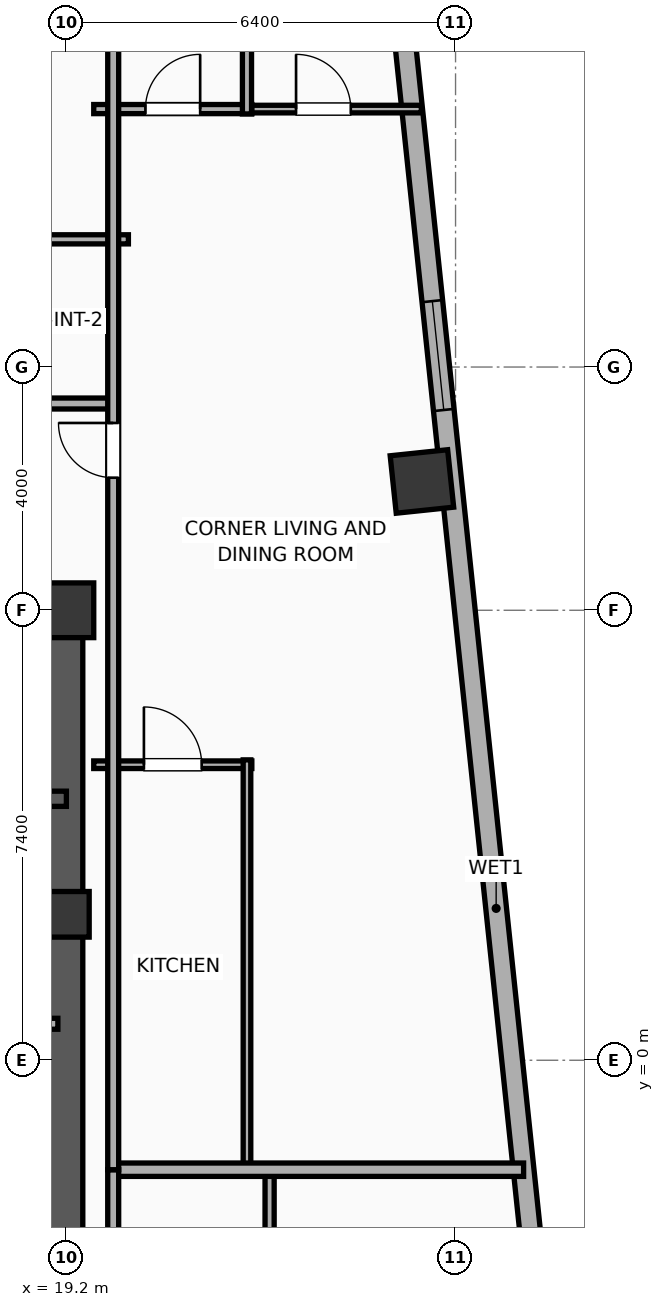
"""IFC4 building model, lengths in metres.
Left out: names, types, materials, properties, quantities, classifications, styles, units other than length and angle.
Written with IfcOpenShell. Run it as: python <this file> out.ifc"""

import sys

from ifc_helpers import new_model, si_unit, direction, frame, frame_2d, origin, origin_2d, place, context, subcontext, project, spatial, rectangle, hollow_rectangle, extrude, element, fill, save


model = new_model("IFC4")
c1 = context("Model", 3, precision=1e-05, world=origin(), true_north=direction((0.0, 1.0)))
c2 = subcontext(c1, "Body", "Model", "MODEL_VIEW")
j1 = project(units=[si_unit("LENGTHUNIT", "METRE"), si_unit("PLANEANGLEUNIT", "RADIAN")], contexts=[c1])
p1 = place(None, origin())
s1 = spatial("IfcSite", under=j1, at=p1, CompositionType="ELEMENT")
p2 = place(p1, origin())
s2 = spatial("IfcBuilding", under=s1, at=p2, CompositionType="ELEMENT")
p3 = place(p2, frame((0.0, 0.0, 175.5)))
s3 = spatial("IfcBuildingStorey", under=s2, at=p3, CompositionType="ELEMENT", Elevation=175.5)
p4 = place(p3, frame((19.2, 2.4, 0.0), z_axis=(0.0, 0.0, 1.0), x_axis=(1.0, 0.0, 0.0)))
e1 = element("IfcColumn", 1, at=p4, inside=s3, PredefinedType="COLUMN", context=c2, shape_type="SweptSolid", body=[
    extrude(rectangle(XDim=0.75, YDim=0.75, at=origin_2d()), origin(), (0.0, 0.0, 1.0), 3.9),
])
p5 = place(p3, frame((19.2, 7.4, 0.0), z_axis=(0.0, 0.0, 1.0), x_axis=(1.0, 0.0, 0.0)))
e2 = element("IfcColumn", 2, at=p5, inside=s3, PredefinedType="COLUMN", context=c2, shape_type="SweptSolid", body=[
    extrude(rectangle(XDim=0.9, YDim=0.9, at=origin_2d()), origin(), (0.0, 0.0, 1.0), 3.9),
])
p6 = place(p3, frame((12.175, 7.4, 0.0), z_axis=(0.0, 0.0, 1.0), x_axis=(1.0, 0.0, 0.0)))
e3 = element("IfcWall", 3, at=p6, inside=s3, PredefinedType="SHEAR", context=c2, shape_type="SweptSolid", body=[
    extrude(rectangle(XDim=7.25, YDim=0.45, at=frame_2d((3.625, 0.0))), origin(), (0.0, 0.0, 1.0), 3.65),
])
p7 = place(p3, frame((19.145, -7.4, 0.0), z_axis=(0.0, 0.0, 1.0), x_axis=(0.0, 1.0, 0.0)))
e4 = element("IfcWall", 4, at=p7, inside=s3, PredefinedType="SHEAR", context=c2, shape_type="SweptSolid", body=[
    extrude(rectangle(XDim=14.8, YDim=0.65, at=frame_2d((7.4, 0.0))), origin(), (0.0, 0.0, 1.0), 3.65),
])
p8 = place(p3, frame((25.047, 9.518, 0.0), z_axis=(0.0, 0.0, 1.0), x_axis=(0.994521895368, 0.104528463268, 0.0)))
e5 = element("IfcColumn", 5, at=p8, inside=s3, PredefinedType="COLUMN", context=c2, shape_type="SweptSolid", body=[
    extrude(hollow_rectangle(XDim=0.95, YDim=0.95, WallThickness=0.032, at=origin_2d()), origin(), (0.0, 0.0, 1.0), 3.9),
])
p9 = place(p3, frame((24.534, 18.99, 0.0), z_axis=(0.0, 0.0, 1.0), x_axis=(0.104534959766, -0.994521212537, 0.0)))
e6 = element("IfcWall", 6, at=p9, inside=s3, PredefinedType="ELEMENTEDWALL", context=c2, shape_type="SweptSolid", body=[
    extrude(rectangle(XDim=33.166, YDim=0.34, at=frame_2d((16.583, 0.0))), origin(), (0.0, 0.0, 1.0), 3.65),
])
p10 = place(p9, frame((6.542, 0.0, 0.75)))
e7 = element("IfcOpeningElement", 7, at=p10, cuts=e6, PredefinedType="OPENING", context=c2, shape_type="SweptSolid", body=[
    extrude(rectangle(XDim=1.8, YDim=2.1, at=frame_2d((0.9, 1.05))), frame((0.0, 0.18, 0.0), z_axis=(0.0, -1.0, 0.0), x_axis=(1.0, 0.0, 0.0)), (0.0, 0.0, 1.0), 0.36),
])
p11 = place(p9, frame((24.825, 0.0, 0.75)))
e8 = element("IfcOpeningElement", 8, at=p11, cuts=e6, PredefinedType="OPENING", context=c2, shape_type="SweptSolid", body=[
    extrude(rectangle(XDim=1.8, YDim=2.1, at=frame_2d((0.9, 1.05))), frame((0.0, 0.18, 0.0), z_axis=(0.0, -1.0, 0.0), x_axis=(1.0, 0.0, 0.0)), (0.0, 0.0, 1.0), 0.36),
])
p12 = place(p3, frame((16.6, 4.3, 0.0), z_axis=(0.0, 0.0, 1.0), x_axis=(1.0, 0.0, 0.0)))
e9 = element("IfcWall", 9, at=p12, inside=s3, PredefinedType="SOLIDWALL", context=c2, shape_type="SweptSolid", body=[
    extrude(rectangle(XDim=2.6, YDim=0.25, at=frame_2d((1.3, 0.0))), origin(), (0.0, 0.0, 1.0), 3.65),
])
p13 = place(p3, frame((15.7, 0.6, 0.0), z_axis=(0.0, 0.0, 1.0), x_axis=(1.0, 0.0, 0.0)))
e10 = element("IfcWall", 10, at=p13, inside=s3, PredefinedType="PARTITIONING", context=c2, shape_type="SweptSolid", body=[
    extrude(rectangle(XDim=3.36, YDim=0.18, at=frame_2d((1.68, 0.0))), origin(), (0.0, 0.0, 1.0), 3.65),
])
p14 = place(p13, frame((1.155, 0.0, 0.0)))
e11 = element("IfcOpeningElement", 11, at=p14, cuts=e10, PredefinedType="OPENING", context=c2, shape_type="SweptSolid", body=[
    extrude(rectangle(XDim=1.05, YDim=2.05, at=frame_2d((0.525, 1.025))), frame((0.0, 0.1, 0.0), z_axis=(0.0, -1.0, 0.0), x_axis=(1.0, 0.0, 0.0)), (0.0, 0.0, 1.0), 0.2),
])
p15 = place(p3, frame((17.539, 13.5, 0.0), z_axis=(0.0, 0.0, 1.0), x_axis=(1.0, 0.0, 0.0)))
e12 = element("IfcWall", 12, at=p15, inside=s3, PredefinedType="PLUMBINGWALL", context=c2, shape_type="SweptSolid", body=[
    extrude(rectangle(XDim=2.681, YDim=0.15, at=frame_2d((1.34, 0.0))), origin(), (0.0, 0.0, 1.0), 3.65),
])
p16 = place(p3, frame((8.08, 10.8, 0.0), z_axis=(0.0, 0.0, 1.0), x_axis=(1.0, 0.0, 0.0)))
e13 = element("IfcWall", 13, at=p16, inside=s3, PredefinedType="PARTITIONING", context=c2, shape_type="SweptSolid", body=[
    extrude(rectangle(XDim=11.92, YDim=0.18, at=frame_2d((5.96, 0.0))), origin(), (0.0, 0.0, 1.0), 3.65),
])
p17 = place(p16, frame((2.646, 0.0, 0.0)))
e14 = element("IfcOpeningElement", 14, at=p17, cuts=e13, PredefinedType="OPENING", context=c2, shape_type="SweptSolid", body=[
    extrude(rectangle(XDim=0.9, YDim=2.05, at=frame_2d((0.45, 1.025))), frame((0.0, 0.1, 0.0), z_axis=(0.0, -1.0, 0.0), x_axis=(1.0, 0.0, 0.0)), (0.0, 0.0, 1.0), 0.2),
])
p18 = place(p16, frame((7.179, 0.0, 0.0)))
e15 = element("IfcOpeningElement", 15, at=p18, cuts=e13, PredefinedType="OPENING", context=c2, shape_type="SweptSolid", body=[
    extrude(rectangle(XDim=1.15, YDim=2.05, at=frame_2d((0.575, 1.025))), frame((0.0, 0.1, 0.0), z_axis=(0.0, -1.0, 0.0), x_axis=(1.0, 0.0, 0.0)), (0.0, 0.0, 1.0), 0.2),
])
p19 = place(p3, frame((22.542, -8.268, 0.0), z_axis=(0.0, 0.0, 1.0), x_axis=(0.0, 1.0, 0.0)))
e16 = element("IfcWall", 16, at=p19, inside=s3, PredefinedType="PLUMBINGWALL", context=c2, shape_type="SweptSolid", body=[
    extrude(rectangle(XDim=6.448, YDim=0.15, at=frame_2d((3.224, 0.0))), origin(), (0.0, 0.0, 1.0), 3.65),
])
p20 = place(p3, frame((22.11, 15.642, 0.0), z_axis=(0.0, 0.0, 1.0), x_axis=(1.0, 0.0, 0.0)))
e17 = element("IfcWall", 17, at=p20, inside=s3, PredefinedType="PARTITIONING", context=c2, shape_type="SweptSolid", body=[
    extrude(rectangle(XDim=2.927, YDim=0.125, at=frame_2d((1.463, 0.0))), origin(), (0.0, 0.0, 1.0), 3.65),
])
p21 = place(p20, frame((0.867, 0.0, 0.0)))
e18 = element("IfcOpeningElement", 18, at=p21, cuts=e17, PredefinedType="OPENING", context=c2, shape_type="SweptSolid", body=[
    extrude(rectangle(XDim=0.9, YDim=2.05, at=frame_2d((0.45, 1.025))), frame((0.0, 0.073, 0.0), z_axis=(0.0, -1.0, 0.0), x_axis=(1.0, 0.0, 0.0)), (0.0, 0.0, 1.0), 0.145),
])
p22 = place(p3, frame((19.65, 4.86, 0.0), z_axis=(0.0, 0.0, 1.0), x_axis=(1.0, 0.0, 0.0)))
e19 = element("IfcWall", 19, at=p22, inside=s3, PredefinedType="PARTITIONING", context=c2, shape_type="SweptSolid", body=[
    extrude(rectangle(XDim=2.6, YDim=0.125, at=frame_2d((1.3, 0.0))), origin(), (0.0, 0.0, 1.0), 3.65),
])
p23 = place(p22, frame((0.825, 0.0, 0.0)))
e20 = element("IfcOpeningElement", 20, at=p23, cuts=e19, PredefinedType="OPENING", context=c2, shape_type="SweptSolid", body=[
    extrude(rectangle(XDim=0.95, YDim=2.05, at=frame_2d((0.475, 1.025))), frame((0.0, 0.073, 0.0), z_axis=(0.0, -1.0, 0.0), x_axis=(1.0, 0.0, 0.0)), (0.0, 0.0, 1.0), 0.145),
])
p24 = place(p3, frame((19.65, 15.642, 0.0), z_axis=(0.0, 0.0, 1.0), x_axis=(1.0, 0.0, 0.0)))
e21 = element("IfcWall", 21, at=p24, inside=s3, PredefinedType="PLUMBINGWALL", context=c2, shape_type="SweptSolid", body=[
    extrude(rectangle(XDim=2.6, YDim=0.15, at=frame_2d((1.3, 0.0))), origin(), (0.0, 0.0, 1.0), 3.65),
])
p25 = place(p24, frame((0.85, 0.0, 0.0)))
e22 = element("IfcOpeningElement", 22, at=p25, cuts=e21, PredefinedType="OPENING", context=c2, shape_type="SweptSolid", body=[
    extrude(rectangle(XDim=0.9, YDim=2.05, at=frame_2d((0.45, 1.025))), frame((0.0, 0.085, 0.0), z_axis=(0.0, -1.0, 0.0), x_axis=(1.0, 0.0, 0.0)), (0.0, 0.0, 1.0), 0.17),
])
p26 = place(p3, frame((22.17, -1.78, 0.0), z_axis=(0.0, 0.0, 1.0), x_axis=(0.0, 1.0, 0.0)))
e23 = element("IfcWall", 23, at=p26, inside=s3, PredefinedType="PARTITIONING", context=c2, shape_type="SweptSolid", body=[
    extrude(rectangle(XDim=6.72, YDim=0.125, at=frame_2d((3.36, 0.0))), origin(), (0.0, 0.0, 1.0), 3.65),
])
p27 = place(p3, frame((22.17, 15.562, 0.0), z_axis=(0.0, 0.0, 1.0), x_axis=(0.0, 1.0, 0.0)))
e24 = element("IfcWall", 24, at=p27, inside=s3, PredefinedType="PLUMBINGWALL", context=c2, shape_type="SweptSolid", body=[
    extrude(rectangle(XDim=6.597, YDim=0.15, at=frame_2d((3.299, 0.0))), origin(), (0.0, 0.0, 1.0), 3.04),
])
p28 = place(p3, frame((19.97, -1.8, 0.0), z_axis=(0.0, 0.0, 1.0), x_axis=(1.0, 0.0, 0.0)))
e25 = element("IfcWall", 25, at=p28, inside=s3, PredefinedType="PARTITIONING", context=c2, shape_type="SweptSolid", body=[
    extrude(rectangle(XDim=6.749, YDim=0.22, at=frame_2d((3.375, 0.0))), origin(), (0.0, 0.0, 1.0), 3.65),
])
p29 = place(p3, frame((19.97, -18.506, 0.0), z_axis=(0.0, 0.0, 1.0), x_axis=(0.0, 1.0, 0.0)))
e26 = element("IfcWall", 26, at=p29, inside=s3, PredefinedType="PARTITIONING", context=c2, shape_type="SweptSolid", body=[
    extrude(rectangle(XDim=16.706, YDim=0.18, at=frame_2d((8.353, 0.0))), origin(), (0.0, 0.0, 1.0), 3.65),
])
p30 = place(p29, frame((8.027, 0.0, 0.0)))
e27 = element("IfcOpeningElement", 27, at=p30, cuts=e26, PredefinedType="OPENING", context=c2, shape_type="SweptSolid", body=[
    extrude(rectangle(XDim=0.9, YDim=2.05, at=frame_2d((0.45, 1.025))), frame((0.0, 0.1, 0.0), z_axis=(0.0, -1.0, 0.0), x_axis=(1.0, 0.0, 0.0)), (0.0, 0.0, 1.0), 0.2),
])
p31 = place(p3, frame((19.97, -1.8, 0.0), z_axis=(0.0, 0.0, 1.0), x_axis=(0.0, 1.0, 0.0)))
e28 = element("IfcWall", 28, at=p31, inside=s3, PredefinedType="PARTITIONING", context=c2, shape_type="SweptSolid", body=[
    extrude(rectangle(XDim=23.977, YDim=0.18, at=frame_2d((11.988, 0.0))), origin(), (0.0, 0.0, 1.0), 3.04),
])
p32 = place(p31, frame((11.38, 0.0, 0.0)))
e29 = element("IfcOpeningElement", 29, at=p32, cuts=e28, PredefinedType="OPENING", context=c2, shape_type="SweptSolid", body=[
    extrude(rectangle(XDim=0.9, YDim=2.05, at=frame_2d((0.45, 1.025))), frame((0.0, 0.1, 0.0), z_axis=(0.0, -1.0, 0.0), x_axis=(1.0, 0.0, 0.0)), (0.0, 0.0, 1.0), 0.2),
])
p33 = place(p10, origin())
e30 = element("IfcWindow", 30, at=p33, inside=s3, PartitioningType="SINGLE_PANEL", PredefinedType="WINDOW", context=c2, shape_type="SweptSolid", body=[
    extrude(rectangle(XDim=1.8, YDim=2.1, at=frame_2d((0.9, 1.05))), frame((0.0, 0.03, 0.0), z_axis=(0.0, -1.0, 0.0), x_axis=(1.0, 0.0, 0.0)), (0.0, 0.0, 1.0), 0.06),
])
fill(e7, e30)
p34 = place(p21, origin())
e31 = element("IfcDoor", 31, at=p34, inside=s3, OperationType="SINGLE_SWING_LEFT", PredefinedType="DOOR", context=c2, shape_type="SweptSolid", body=[
    extrude(rectangle(XDim=0.9, YDim=2.05, at=frame_2d((0.45, 1.025))), frame((0.0, 0.025, 0.0), z_axis=(0.0, -1.0, 0.0), x_axis=(1.0, 0.0, 0.0)), (0.0, 0.0, 1.0), 0.05),
])
fill(e18, e31)
p35 = place(p23, origin())
e32 = element("IfcDoor", 32, at=p35, inside=s3, OperationType="SINGLE_SWING_LEFT", PredefinedType="DOOR", context=c2, shape_type="SweptSolid", body=[
    extrude(rectangle(XDim=0.95, YDim=2.05, at=frame_2d((0.475, 1.025))), frame((0.0, 0.025, 0.0), z_axis=(0.0, -1.0, 0.0), x_axis=(1.0, 0.0, 0.0)), (0.0, 0.0, 1.0), 0.05),
])
fill(e20, e32)
p36 = place(p25, origin())
e33 = element("IfcDoor", 33, at=p36, inside=s3, OperationType="SINGLE_SWING_RIGHT", PredefinedType="DOOR", context=c2, shape_type="SweptSolid", body=[
    extrude(rectangle(XDim=0.9, YDim=2.05, at=frame_2d((0.45, 1.025))), frame((0.0, 0.025, 0.0), z_axis=(0.0, -1.0, 0.0), x_axis=(1.0, 0.0, 0.0)), (0.0, 0.0, 1.0), 0.05),
])
fill(e22, e33)
p37 = place(p32, origin())
e34 = element("IfcDoor", 34, at=p37, inside=s3, OperationType="SINGLE_SWING_RIGHT", PredefinedType="DOOR", context=c2, shape_type="SweptSolid", body=[
    extrude(rectangle(XDim=0.9, YDim=2.05, at=frame_2d((0.45, 1.025))), frame((0.0, 0.025, 0.0), z_axis=(0.0, -1.0, 0.0), x_axis=(1.0, 0.0, 0.0)), (0.0, 0.0, 1.0), 0.05),
])
fill(e29, e34)
save(model, sys.argv[1])
